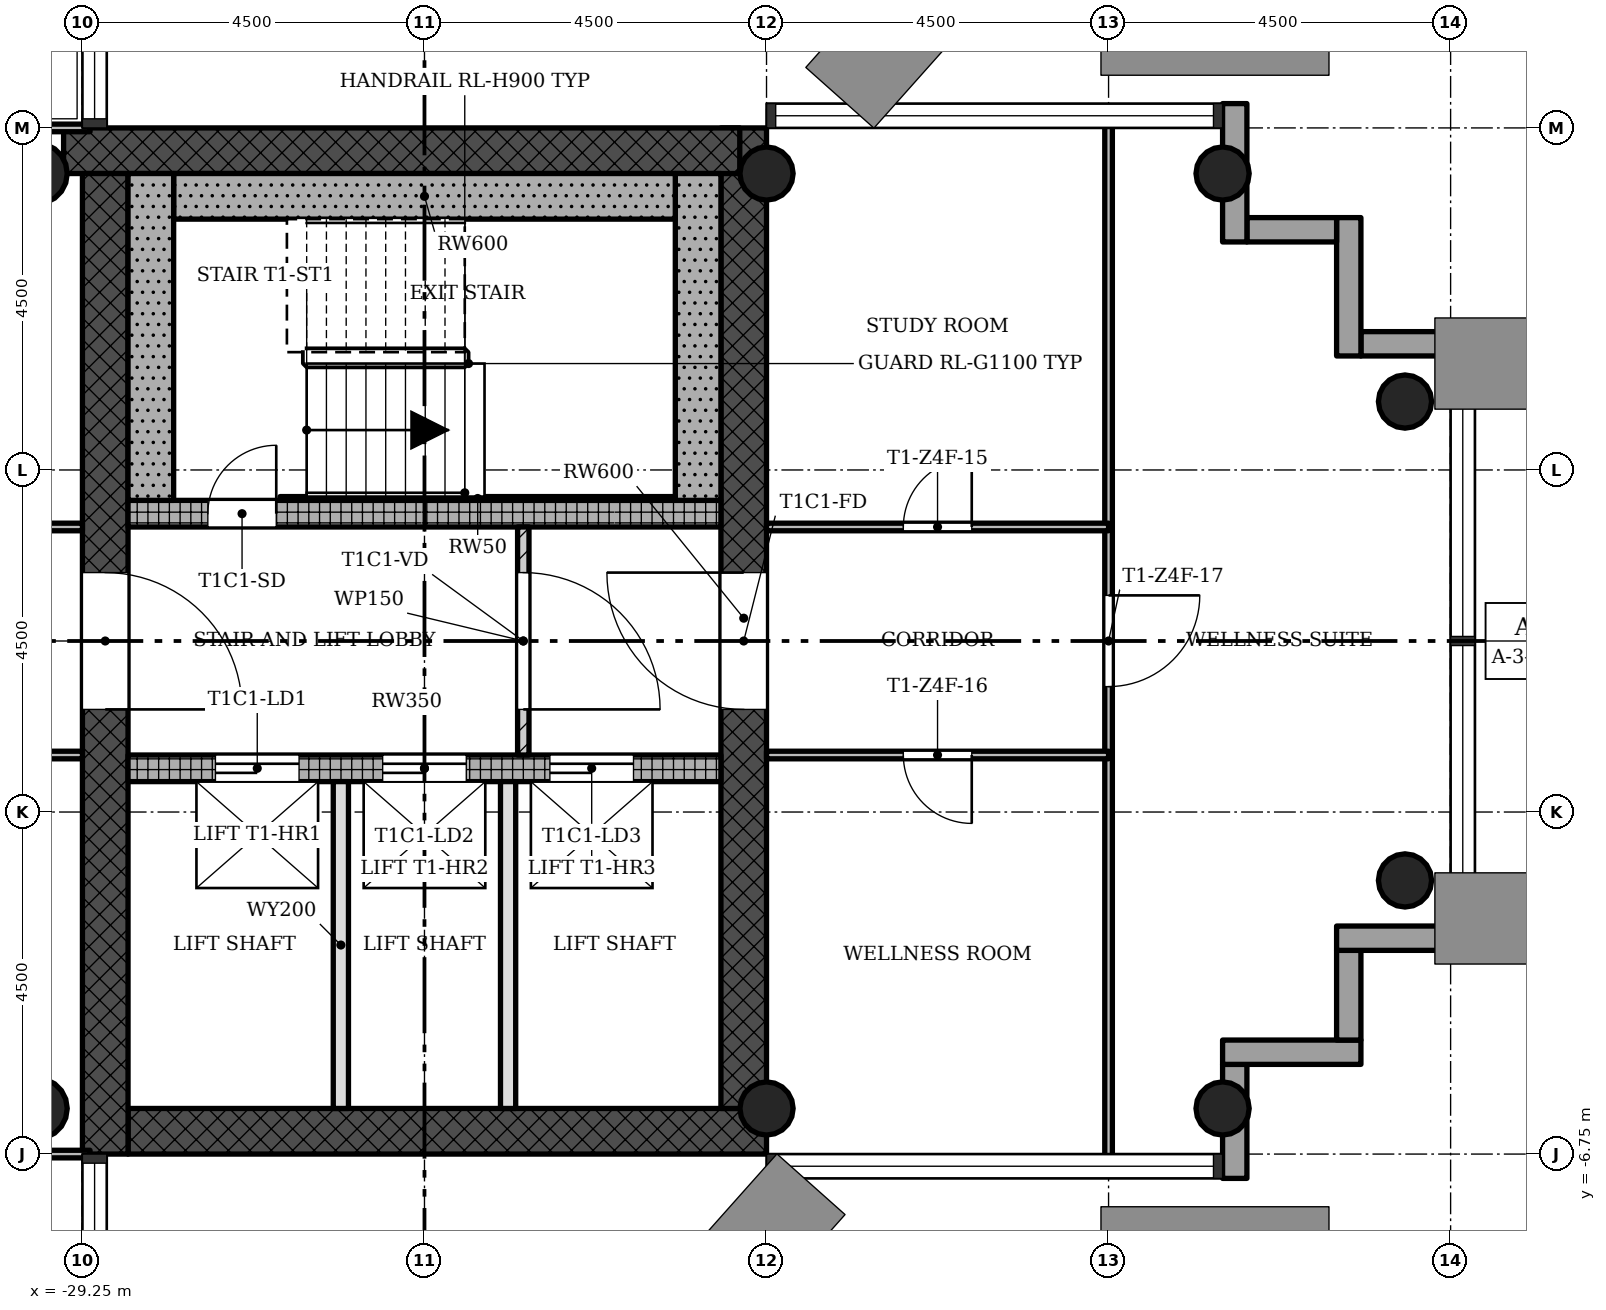
"""IFC4 building model, lengths in metres.
Left out: names, types, materials, properties, quantities, classifications, styles, units other than length and angle.
Written with IfcOpenShell. Run it as: python <this file> out.ifc"""

import sys

from ifc_helpers import new_model, si_unit, direction, frame, frame_2d, origin, origin_2d, place, context, subcontext, project, spatial, rectangle, hollow_circle, extrude, element, fill, save


model = new_model("IFC4")
c1 = context("Model", 3, precision=1e-05, world=origin(), true_north=direction((0.0, 1.0)))
c2 = subcontext(c1, "Body", "Model", "MODEL_VIEW")
j1 = project(units=[si_unit("LENGTHUNIT", "METRE"), si_unit("PLANEANGLEUNIT", "RADIAN")], contexts=[c1])
p1 = place(None, origin())
s1 = spatial("IfcSite", under=j1, at=p1, CompositionType="ELEMENT")
p2 = place(p1, origin())
s2 = spatial("IfcBuilding", under=s1, at=p2, CompositionType="ELEMENT")
p3 = place(p2, frame((0.0, 0.0, 216.4)))
s3 = spatial("IfcBuildingStorey", under=s2, at=p3, CompositionType="ELEMENT", Elevation=216.4)
p4 = place(p3, frame((-28.65, -6.45, 0.0), z_axis=(0.0, 0.0, 1.0), x_axis=(1.0, 0.0, 0.0)))
e1 = element("IfcWall", 1, at=p4, inside=s3, PredefinedType="SHEAR", context=c2, shape_type="SweptSolid", body=[
    extrude(rectangle(XDim=8.4, YDim=0.6, at=frame_2d((4.2, 0.0))), origin(), (0.0, 0.0, 1.0), 3.4),
])
p5 = place(p3, frame((-20.55, -6.15, 0.0), z_axis=(0.0, 0.0, 1.0), x_axis=(0.0, 1.0, 0.0)))
e2 = element("IfcWall", 2, at=p5, inside=s3, PredefinedType="SHEAR", context=c2, shape_type="SweptSolid", body=[
    extrude(rectangle(XDim=12.9, YDim=0.6, at=frame_2d((6.45, 0.0))), origin(), (0.0, 0.0, 1.0), 3.4),
])
p6 = place(p5, frame((5.25, 0.0, 0.0)))
e3 = element("IfcOpeningElement", 3, at=p6, cuts=e2, PredefinedType="OPENING", context=c2, shape_type="SweptSolid", body=[
    extrude(rectangle(XDim=1.8, YDim=2.1, at=frame_2d((0.9, 1.05))), frame((0.0, 0.31, 0.0), z_axis=(0.0, -1.0, 0.0), x_axis=(1.0, 0.0, 0.0)), (0.0, 0.0, 1.0), 0.62),
])
p7 = place(p3, frame((-20.602, 6.45, 0.0), z_axis=(0.0, 0.0, 1.0), x_axis=(-1.0, 0.0, 0.0)))
e4 = element("IfcWall", 4, at=p7, inside=s3, PredefinedType="SHEAR", context=c2, shape_type="SweptSolid", body=[
    extrude(rectangle(XDim=8.896, YDim=0.6, at=frame_2d((4.448, 0.0))), origin(), (0.0, 0.0, 1.0), 3.4),
])
p8 = place(p3, frame((-28.95, 6.15, 0.0), z_axis=(0.0, 0.0, 1.0), x_axis=(0.0, -1.0, 0.0)))
e5 = element("IfcWall", 5, at=p8, inside=s3, PredefinedType="SHEAR", context=c2, shape_type="SweptSolid", body=[
    extrude(rectangle(XDim=12.9, YDim=0.6, at=frame_2d((6.45, 0.0))), origin(), (0.0, 0.0, 1.0), 3.4),
])
p9 = place(p8, frame((5.25, 0.0, 0.0)))
e6 = element("IfcOpeningElement", 6, at=p9, cuts=e5, PredefinedType="OPENING", context=c2, shape_type="SweptSolid", body=[
    extrude(rectangle(XDim=1.8, YDim=2.1, at=frame_2d((0.9, 1.05))), frame((0.0, 0.31, 0.0), z_axis=(0.0, -1.0, 0.0), x_axis=(1.0, 0.0, 0.0)), (0.0, 0.0, 1.0), 0.62),
])
p10 = place(p3, frame((-28.65, -1.675, 0.0), z_axis=(0.0, 0.0, 1.0), x_axis=(1.0, 0.0, 0.0)))
e7 = element("IfcWall", 7, at=p10, inside=s3, PredefinedType="SHEAR", context=c2, shape_type="SweptSolid", body=[
    extrude(rectangle(XDim=7.8, YDim=0.35, at=frame_2d((3.9, 0.0))), origin(), (0.0, 0.0, 1.0), 3.4),
])
p11 = place(p10, frame((1.15, 0.0, 0.0)))
e8 = element("IfcOpeningElement", 8, at=p11, cuts=e7, PredefinedType="OPENING", context=c2, shape_type="SweptSolid", body=[
    extrude(rectangle(XDim=1.1, YDim=2.1, at=frame_2d((0.55, 1.05))), frame((0.0, 0.185, 0.0), z_axis=(0.0, -1.0, 0.0), x_axis=(1.0, 0.0, 0.0)), (0.0, 0.0, 1.0), 0.37),
])
p12 = place(p10, frame((3.35, 0.0, 0.0)))
e9 = element("IfcOpeningElement", 9, at=p12, cuts=e7, PredefinedType="OPENING", context=c2, shape_type="SweptSolid", body=[
    extrude(rectangle(XDim=1.1, YDim=2.1, at=frame_2d((0.55, 1.05))), frame((0.0, 0.185, 0.0), z_axis=(0.0, -1.0, 0.0), x_axis=(1.0, 0.0, 0.0)), (0.0, 0.0, 1.0), 0.37),
])
p13 = place(p10, frame((5.55, 0.0, 0.0)))
e10 = element("IfcOpeningElement", 10, at=p13, cuts=e7, PredefinedType="OPENING", context=c2, shape_type="SweptSolid", body=[
    extrude(rectangle(XDim=1.1, YDim=2.1, at=frame_2d((0.55, 1.05))), frame((0.0, 0.185, 0.0), z_axis=(0.0, -1.0, 0.0), x_axis=(1.0, 0.0, 0.0)), (0.0, 0.0, 1.0), 0.37),
])
p14 = place(p3, frame((-28.65, 1.675, 0.0), z_axis=(0.0, 0.0, 1.0), x_axis=(1.0, 0.0, 0.0)))
e11 = element("IfcWall", 11, at=p14, inside=s3, PredefinedType="SHEAR", context=c2, shape_type="SweptSolid", body=[
    extrude(rectangle(XDim=7.8, YDim=0.35, at=frame_2d((3.9, 0.0))), origin(), (0.0, 0.0, 1.0), 3.4),
])
p15 = place(p14, frame((1.05, 0.0, 0.0)))
e12 = element("IfcOpeningElement", 12, at=p15, cuts=e11, PredefinedType="OPENING", context=c2, shape_type="SweptSolid", body=[
    extrude(rectangle(XDim=0.9, YDim=2.1, at=frame_2d((0.45, 1.05))), frame((0.0, 0.185, 0.0), z_axis=(0.0, -1.0, 0.0), x_axis=(1.0, 0.0, 0.0)), (0.0, 0.0, 1.0), 0.37),
])
for number, where, z_axis, x_axis in (
    (13, (-20.25, -6.15, 0.0), (0.0, 0.0, 1.0), (1.0, 0.0, 0.0)),
    (14, (-20.25, 6.15, 0.0), (0.0, 0.0, 1.0), (1.0, 0.0, 0.0)),
    (15, (-14.25, -6.15, 0.0), (0.0, 0.0, 1.0), (1.0, 0.0, 0.0)),
    (16, (-14.25, 6.15, 0.0), (0.0, 0.0, 1.0), (1.0, 0.0, 0.0)),
    (17, (-11.85, -3.15, 0.0), (0.0, 0.0, 1.0), (1.0, 0.0, 0.0)),
    (18, (-11.85, 3.15, 0.0), (0.0, 0.0, 1.0), (1.0, 0.0, 0.0)),
):
    element("IfcColumn", number, at=place(p3, frame(where, z_axis=z_axis, x_axis=x_axis)), inside=s3, PredefinedType="COLUMN", context=c2, shape_type="SweptSolid", body=[
        extrude(hollow_circle(Radius=0.35, WallThickness=0.025, at=origin_2d()), origin(), (0.0, 0.0, 1.0), 3.4),
    ])
for number, where, z_axis, x_axis in (
    (19, (-29.85, -6.15, 0.0), (0.0, 0.0, 1.0), (1.0, 0.0, 0.0)),
    (20, (-29.85, 6.15, 0.0), (0.0, 0.0, 1.0), (1.0, 0.0, 0.0)),
):
    element("IfcColumn", number, at=place(p3, frame(where, z_axis=z_axis, x_axis=x_axis)), inside=s3, PredefinedType="COLUMN", context=c2, shape_type="SweptSolid", body=[
        extrude(hollow_circle(Radius=0.4, WallThickness=0.028, at=origin_2d()), origin(), (0.0, 0.0, 1.0), 3.4),
    ])
p16 = place(p3, frame((-14.09, -7.07, -0.3), z_axis=(0.0, 0.0, 1.0), x_axis=(0.0, 1.0, 0.0)))
e21 = element("IfcWall", 21, at=p16, inside=s3, PredefinedType="STANDARD", context=c2, shape_type="SweptSolid", body=[
    extrude(rectangle(XDim=1.5, YDim=0.32, at=frame_2d((0.75, 0.0))), origin(), (0.0, 0.0, 1.0), 3.4),
])
p17 = place(p3, frame((-14.25, -5.41, -0.3), z_axis=(0.0, 0.0, 1.0), x_axis=(1.0, 0.0, 0.0)))
e22 = element("IfcWall", 22, at=p17, inside=s3, PredefinedType="STANDARD", context=c2, shape_type="SweptSolid", body=[
    extrude(rectangle(XDim=1.82, YDim=0.32, at=frame_2d((0.91, 0.0))), origin(), (0.0, 0.0, 1.0), 3.4),
])
p18 = place(p3, frame((-12.59, -5.25, -0.3), z_axis=(0.0, 0.0, 1.0), x_axis=(0.0, 1.0, 0.0)))
e23 = element("IfcWall", 23, at=p18, inside=s3, PredefinedType="STANDARD", context=c2, shape_type="SweptSolid", body=[
    extrude(rectangle(XDim=1.18, YDim=0.32, at=frame_2d((0.59, 0.0))), origin(), (0.0, 0.0, 1.0), 3.4),
])
p19 = place(p3, frame((-12.75, -3.91, -0.3), z_axis=(0.0, 0.0, 1.0), x_axis=(1.0, 0.0, 0.0)))
e24 = element("IfcWall", 24, at=p19, inside=s3, PredefinedType="STANDARD", context=c2, shape_type="SweptSolid", body=[
    extrude(rectangle(XDim=1.82, YDim=0.32, at=frame_2d((0.91, 0.0))), origin(), (0.0, 0.0, 1.0), 3.4),
])
p20 = place(p3, frame((-10.93, 3.91, -0.3), z_axis=(0.0, 0.0, 1.0), x_axis=(-1.0, 0.0, 0.0)))
e25 = element("IfcWall", 25, at=p20, inside=s3, PredefinedType="STANDARD", context=c2, shape_type="SweptSolid", body=[
    extrude(rectangle(XDim=1.5, YDim=0.32, at=frame_2d((0.75, 0.0))), origin(), (0.0, 0.0, 1.0), 3.4),
])
p21 = place(p3, frame((-12.59, 3.75, -0.3), z_axis=(0.0, 0.0, 1.0), x_axis=(0.0, 1.0, 0.0)))
e26 = element("IfcWall", 26, at=p21, inside=s3, PredefinedType="STANDARD", context=c2, shape_type="SweptSolid", body=[
    extrude(rectangle(XDim=1.82, YDim=0.32, at=frame_2d((0.91, 0.0))), origin(), (0.0, 0.0, 1.0), 3.4),
])
p22 = place(p3, frame((-12.75, 5.41, -0.3), z_axis=(0.0, 0.0, 1.0), x_axis=(-1.0, 0.0, 0.0)))
e27 = element("IfcWall", 27, at=p22, inside=s3, PredefinedType="STANDARD", context=c2, shape_type="SweptSolid", body=[
    extrude(rectangle(XDim=1.18, YDim=0.32, at=frame_2d((0.59, 0.0))), origin(), (0.0, 0.0, 1.0), 3.4),
])
p23 = place(p3, frame((-14.09, 5.25, -0.3), z_axis=(0.0, 0.0, 1.0), x_axis=(0.0, 1.0, 0.0)))
e28 = element("IfcWall", 28, at=p23, inside=s3, PredefinedType="STANDARD", context=c2, shape_type="SweptSolid", body=[
    extrude(rectangle(XDim=1.82, YDim=0.32, at=frame_2d((0.91, 0.0))), origin(), (0.0, 0.0, 1.0), 3.4),
])
p24 = place(p3, frame((-23.45, -1.5, 0.0), z_axis=(0.0, 0.0, 1.0), x_axis=(0.0, 1.0, 0.0)))
e29 = element("IfcWall", 29, at=p24, inside=s3, PredefinedType="PARTITIONING", context=c2, shape_type="SweptSolid", body=[
    extrude(rectangle(XDim=3.0, YDim=0.15, at=frame_2d((1.5, 0.0))), origin(), (0.0, 0.0, 1.0), 3.0),
])
p25 = place(p24, frame((0.6, 0.0, 0.0)))
e30 = element("IfcOpeningElement", 30, at=p25, cuts=e29, PredefinedType="OPENING", context=c2, shape_type="SweptSolid", body=[
    extrude(rectangle(XDim=1.8, YDim=2.1, at=frame_2d((0.9, 1.05))), frame((0.0, 0.085, 0.0), z_axis=(0.0, -1.0, 0.0), x_axis=(1.0, 0.0, 0.0)), (0.0, 0.0, 1.0), 0.17),
])
for number, where, z_axis, x_axis in (
    (31, (-25.85, -6.15, 0.0), (0.0, 0.0, 1.0), (0.0, 1.0, 0.0)),
    (32, (-23.65, -6.15, 0.0), (0.0, 0.0, 1.0), (0.0, 1.0, 0.0)),
):
    element("IfcWall", number, at=place(p3, frame(where, z_axis=z_axis, x_axis=x_axis)), inside=s3, PredefinedType="SOLIDWALL", context=c2, shape_type="SweptSolid", body=[
        extrude(rectangle(XDim=4.3, YDim=0.2, at=frame_2d((2.15, 0.0))), origin(), (0.0, 0.0, 1.0), 3.0),
    ])
p26 = place(p3, frame((-15.75, -6.85, 0.0), z_axis=(0.0, 0.0, 1.0), x_axis=(0.0, 1.0, 0.0)))
e33 = element("IfcWall", 33, at=p26, inside=s3, PredefinedType="PARTITIONING", context=c2, shape_type="SweptSolid", body=[
    extrude(rectangle(XDim=13.7, YDim=0.1, at=frame_2d((6.85, 0.0))), origin(), (0.0, 0.0, 1.0), 3.0),
])
p27 = place(p26, frame((6.25, 0.0, 0.0)))
e34 = element("IfcOpeningElement", 34, at=p27, cuts=e33, PredefinedType="OPENING", context=c2, shape_type="SweptSolid", body=[
    extrude(rectangle(XDim=1.2, YDim=2.1, at=frame_2d((0.6, 1.05))), frame((0.0, 0.06, 0.0), z_axis=(0.0, -1.0, 0.0), x_axis=(1.0, 0.0, 0.0)), (0.0, 0.0, 1.0), 0.12),
])
p28 = place(p3, frame((-35.1, -6.75, 0.0), z_axis=(0.0, 0.0, 1.0), x_axis=(1.0, 0.0, 0.0)))
e35 = element("IfcWall", 35, at=p28, inside=s3, PredefinedType="PARTITIONING", context=c2, shape_type="SweptSolid", body=[
    extrude(rectangle(XDim=5.95, YDim=0.1, at=frame_2d((2.975, 0.0))), origin(), (0.0, 0.0, 1.0), 3.0),
])
p29 = place(p3, frame((-31.5, -1.5, 0.0), z_axis=(0.0, 0.0, 1.0), x_axis=(1.0, 0.0, 0.0)))
e36 = element("IfcWall", 36, at=p29, inside=s3, PredefinedType="PARTITIONING", context=c2, shape_type="SweptSolid", body=[
    extrude(rectangle(XDim=2.25, YDim=0.1, at=frame_2d((1.125, 0.0))), origin(), (0.0, 0.0, 1.0), 3.0),
])
p30 = place(p3, frame((-20.25, -1.5, 0.0), z_axis=(0.0, 0.0, 1.0), x_axis=(1.0, 0.0, 0.0)))
e37 = element("IfcWall", 37, at=p30, inside=s3, PredefinedType="PARTITIONING", context=c2, shape_type="SweptSolid", body=[
    extrude(rectangle(XDim=4.5, YDim=0.1, at=frame_2d((2.25, 0.0))), origin(), (0.0, 0.0, 1.0), 3.0),
])
p31 = place(p30, frame((1.8, 0.0, 0.0)))
e38 = element("IfcOpeningElement", 38, at=p31, cuts=e37, PredefinedType="OPENING", context=c2, shape_type="SweptSolid", body=[
    extrude(rectangle(XDim=0.9, YDim=2.1, at=frame_2d((0.45, 1.05))), frame((0.0, 0.06, 0.0), z_axis=(0.0, -1.0, 0.0), x_axis=(1.0, 0.0, 0.0)), (0.0, 0.0, 1.0), 0.12),
])
p32 = place(p3, frame((-31.5, 1.5, 0.0), z_axis=(0.0, 0.0, 1.0), x_axis=(1.0, 0.0, 0.0)))
e39 = element("IfcWall", 39, at=p32, inside=s3, PredefinedType="PARTITIONING", context=c2, shape_type="SweptSolid", body=[
    extrude(rectangle(XDim=2.25, YDim=0.1, at=frame_2d((1.125, 0.0))), origin(), (0.0, 0.0, 1.0), 3.0),
])
p33 = place(p3, frame((-20.25, 1.5, 0.0), z_axis=(0.0, 0.0, 1.0), x_axis=(1.0, 0.0, 0.0)))
e40 = element("IfcWall", 40, at=p33, inside=s3, PredefinedType="PARTITIONING", context=c2, shape_type="SweptSolid", body=[
    extrude(rectangle(XDim=4.5, YDim=0.1, at=frame_2d((2.25, 0.0))), origin(), (0.0, 0.0, 1.0), 3.0),
])
p34 = place(p33, frame((1.8, 0.0, 0.0)))
e41 = element("IfcOpeningElement", 41, at=p34, cuts=e40, PredefinedType="OPENING", context=c2, shape_type="SweptSolid", body=[
    extrude(rectangle(XDim=0.9, YDim=2.1, at=frame_2d((0.45, 1.05))), frame((0.0, 0.06, 0.0), z_axis=(0.0, -1.0, 0.0), x_axis=(1.0, 0.0, 0.0)), (0.0, 0.0, 1.0), 0.12),
])
p35 = place(p3, frame((-35.1, 6.75, 0.0), z_axis=(0.0, 0.0, 1.0), x_axis=(1.0, 0.0, 0.0)))
e42 = element("IfcWall", 42, at=p35, inside=s3, PredefinedType="PARTITIONING", context=c2, shape_type="SweptSolid", body=[
    extrude(rectangle(XDim=5.95, YDim=0.1, at=frame_2d((2.975, 0.0))), origin(), (0.0, 0.0, 1.0), 3.0),
])
p36 = place(p3, frame((-21.15, 1.85, 0.0), z_axis=(0.0, 0.0, 1.0), x_axis=(0.0, 1.0, 0.0)))
e43 = element("IfcWall", 43, at=p36, inside=s3, PredefinedType="SHEAR", context=c2, shape_type="SweptSolid", body=[
    extrude(rectangle(XDim=4.3, YDim=0.6, at=frame_2d((2.15, 0.0))), origin(), (0.0, 0.0, 1.0), 3.4),
])
p37 = place(p3, frame((-28.05, 5.85, 0.0), z_axis=(0.0, 0.0, 1.0), x_axis=(1.0, 0.0, 0.0)))
e44 = element("IfcWall", 44, at=p37, inside=s3, PredefinedType="SHEAR", context=c2, shape_type="SweptSolid", body=[
    extrude(rectangle(XDim=6.6, YDim=0.6, at=frame_2d((3.3, 0.0))), origin(), (0.0, 0.0, 1.0), 3.4),
])
p38 = place(p3, frame((-28.35, 1.85, 0.0), z_axis=(0.0, 0.0, 1.0), x_axis=(0.0, 1.0, 0.0)))
e45 = element("IfcWall", 45, at=p38, inside=s3, PredefinedType="SHEAR", context=c2, shape_type="SweptSolid", body=[
    extrude(rectangle(XDim=4.3, YDim=0.6, at=frame_2d((2.15, 0.0))), origin(), (0.0, 0.0, 1.0), 3.4),
])
p39 = place(p3, frame((-26.65, 1.875, 0.0), z_axis=(0.0, 0.0, 1.0), x_axis=(1.0, 0.0, 0.0)))
e46 = element("IfcWall", 46, at=p39, inside=s3, PredefinedType="SHEAR", context=c2, shape_type="SweptSolid", body=[
    extrude(rectangle(XDim=5.2, YDim=0.05, at=frame_2d((2.6, 0.0))), origin(), (0.0, 0.0, 1.0), 3.4),
])
p40 = place(p25, origin())
e47 = element("IfcDoor", 47, at=p40, inside=s3, OperationType="SINGLE_SWING_LEFT", PredefinedType="DOOR", context=c2, shape_type="SweptSolid", body=[
    extrude(rectangle(XDim=1.8, YDim=2.1, at=frame_2d((0.9, 1.05))), frame((0.0, 0.025, 0.0), z_axis=(0.0, -1.0, 0.0), x_axis=(1.0, 0.0, 0.0)), (0.0, 0.0, 1.0), 0.05),
])
fill(e30, e47)
p41 = place(p34, origin())
e48 = element("IfcDoor", 48, at=p41, inside=s3, OperationType="SINGLE_SWING_LEFT", PredefinedType="DOOR", context=c2, shape_type="SweptSolid", body=[
    extrude(rectangle(XDim=0.9, YDim=2.1, at=frame_2d((0.45, 1.05))), frame((0.0, 0.025, 0.0), z_axis=(0.0, -1.0, 0.0), x_axis=(1.0, 0.0, 0.0)), (0.0, 0.0, 1.0), 0.05),
])
fill(e41, e48)
p42 = place(p31, origin())
e49 = element("IfcDoor", 49, at=p42, inside=s3, OperationType="SINGLE_SWING_RIGHT", PredefinedType="DOOR", context=c2, shape_type="SweptSolid", body=[
    extrude(rectangle(XDim=0.9, YDim=2.1, at=frame_2d((0.45, 1.05))), frame((0.0, 0.025, 0.0), z_axis=(0.0, -1.0, 0.0), x_axis=(1.0, 0.0, 0.0)), (0.0, 0.0, 1.0), 0.05),
])
fill(e38, e49)
p43 = place(p27, origin())
e50 = element("IfcDoor", 50, at=p43, inside=s3, OperationType="SINGLE_SWING_RIGHT", PredefinedType="DOOR", context=c2, shape_type="SweptSolid", body=[
    extrude(rectangle(XDim=1.2, YDim=2.1, at=frame_2d((0.6, 1.05))), frame((0.0, 0.025, 0.0), z_axis=(0.0, -1.0, 0.0), x_axis=(1.0, 0.0, 0.0)), (0.0, 0.0, 1.0), 0.05),
])
fill(e34, e50)
p44 = place(p15, origin())
e51 = element("IfcDoor", 51, at=p44, inside=s3, OperationType="SINGLE_SWING_LEFT", PredefinedType="DOOR", context=c2, shape_type="SweptSolid", body=[
    extrude(rectangle(XDim=0.9, YDim=2.1, at=frame_2d((0.45, 1.05))), frame((0.0, 0.025, 0.0), z_axis=(0.0, -1.0, 0.0), x_axis=(1.0, 0.0, 0.0)), (0.0, 0.0, 1.0), 0.05),
])
fill(e12, e51)
p45 = place(p11, origin())
e52 = element("IfcDoor", 52, at=p45, inside=s3, OperationType="SLIDING_TO_LEFT", PredefinedType="DOOR", context=c2, shape_type="SweptSolid", body=[
    extrude(rectangle(XDim=1.1, YDim=2.1, at=frame_2d((0.55, 1.05))), frame((0.0, 0.025, 0.0), z_axis=(0.0, -1.0, 0.0), x_axis=(1.0, 0.0, 0.0)), (0.0, 0.0, 1.0), 0.05),
])
fill(e8, e52)
p46 = place(p12, origin())
e53 = element("IfcDoor", 53, at=p46, inside=s3, OperationType="SLIDING_TO_LEFT", PredefinedType="DOOR", context=c2, shape_type="SweptSolid", body=[
    extrude(rectangle(XDim=1.1, YDim=2.1, at=frame_2d((0.55, 1.05))), frame((0.0, 0.025, 0.0), z_axis=(0.0, -1.0, 0.0), x_axis=(1.0, 0.0, 0.0)), (0.0, 0.0, 1.0), 0.05),
])
fill(e9, e53)
p47 = place(p13, origin())
e54 = element("IfcDoor", 54, at=p47, inside=s3, OperationType="SLIDING_TO_LEFT", PredefinedType="DOOR", context=c2, shape_type="SweptSolid", body=[
    extrude(rectangle(XDim=1.1, YDim=2.1, at=frame_2d((0.55, 1.05))), frame((0.0, 0.025, 0.0), z_axis=(0.0, -1.0, 0.0), x_axis=(1.0, 0.0, 0.0)), (0.0, 0.0, 1.0), 0.05),
])
fill(e10, e54)
p48 = place(p9, origin())
e55 = element("IfcDoor", 55, at=p48, inside=s3, OperationType="SINGLE_SWING_LEFT", PredefinedType="DOOR", context=c2, shape_type="SweptSolid", body=[
    extrude(rectangle(XDim=1.8, YDim=2.1, at=frame_2d((0.9, 1.05))), frame((0.0, 0.025, 0.0), z_axis=(0.0, -1.0, 0.0), x_axis=(1.0, 0.0, 0.0)), (0.0, 0.0, 1.0), 0.05),
])
fill(e6, e55)
p49 = place(p6, origin())
e56 = element("IfcDoor", 56, at=p49, inside=s3, OperationType="SINGLE_SWING_LEFT", PredefinedType="DOOR", context=c2, shape_type="SweptSolid", body=[
    extrude(rectangle(XDim=1.8, YDim=2.1, at=frame_2d((0.9, 1.05))), frame((0.0, 0.025, 0.0), z_axis=(0.0, -1.0, 0.0), x_axis=(1.0, 0.0, 0.0)), (0.0, 0.0, 1.0), 0.05),
])
fill(e3, e56)
save(model, sys.argv[1])
